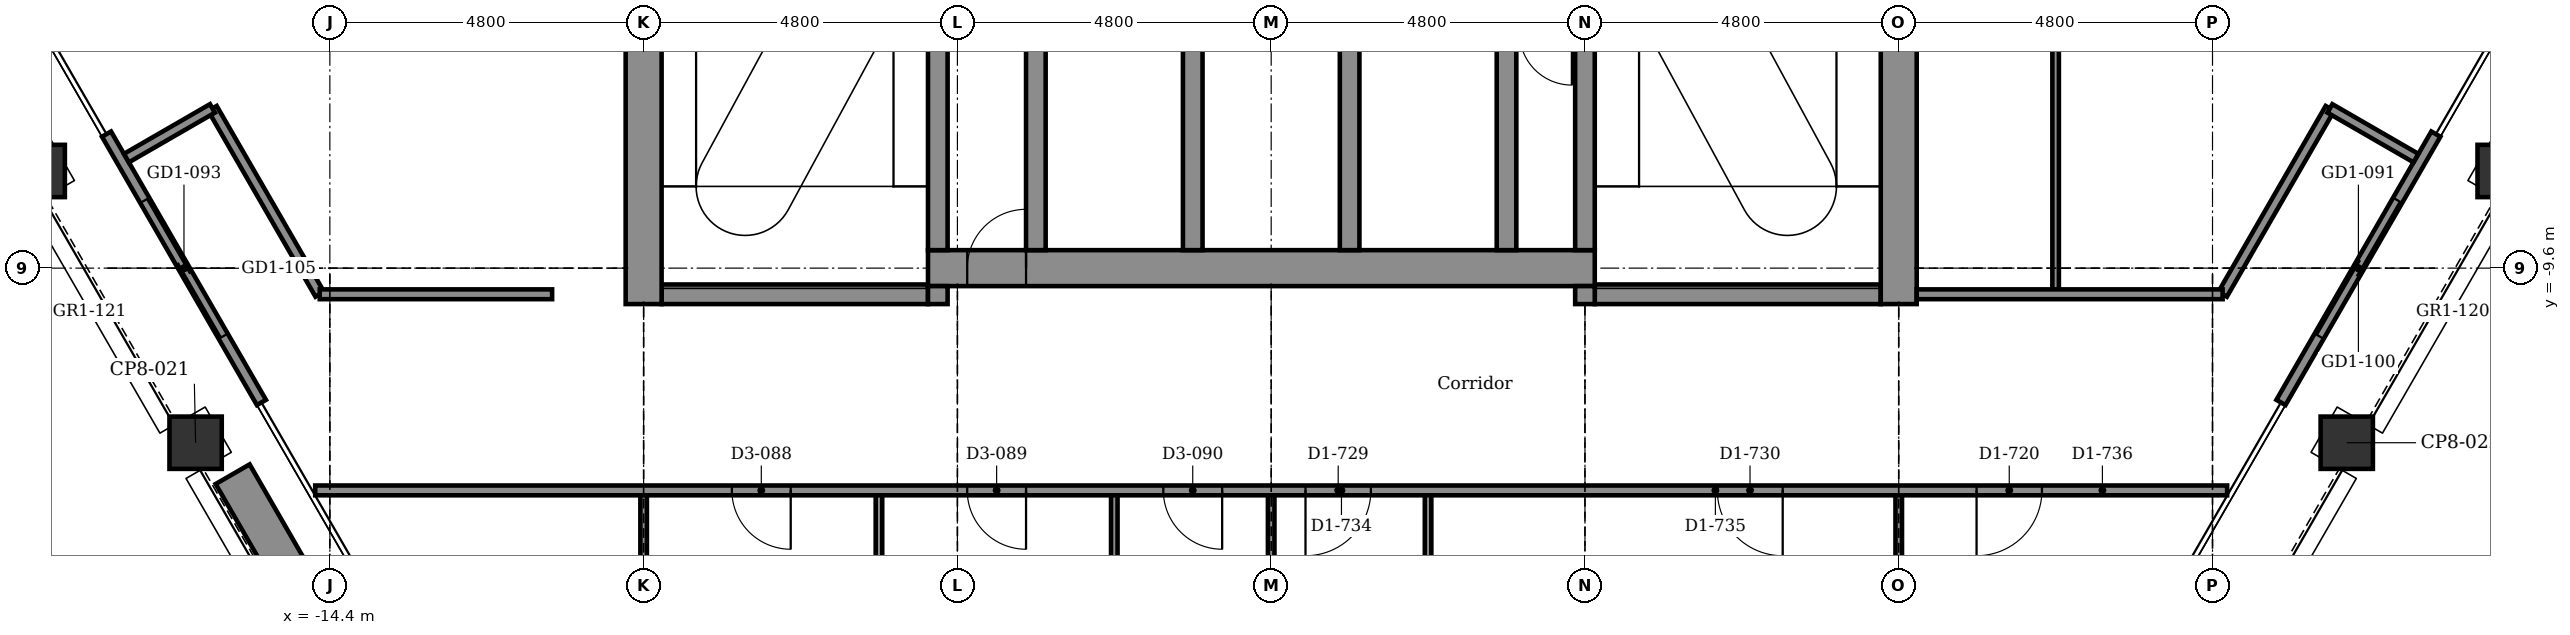
"""IFC4 building model, lengths in metres.
Left out: names, types, materials, properties, quantities, classifications, styles, units other than length and angle.
Written with IfcOpenShell. Run it as: python <this file> out.ifc"""

import sys

from ifc_helpers import new_model, si_unit, direction, frame, frame_2d, origin, origin_2d, place, context, subcontext, project, spatial, rectangle, extrude, element, fill, save


model = new_model("IFC4")
c1 = context("Model", 3, precision=1e-05, world=origin(), true_north=direction((0.0, 1.0)))
c2 = subcontext(c1, "Body", "Model", "MODEL_VIEW")
j1 = project(units=[si_unit("LENGTHUNIT", "METRE"), si_unit("PLANEANGLEUNIT", "RADIAN")], contexts=[c1])
p1 = place(None, origin())
s1 = spatial("IfcSite", under=j1, at=p1, CompositionType="ELEMENT")
p2 = place(p1, origin())
s2 = spatial("IfcBuilding", under=s1, at=p2, CompositionType="ELEMENT")
p3 = place(p2, frame((0.0, 0.0, 273.5)))
s3 = spatial("IfcBuildingStorey", under=s2, at=p3, CompositionType="ELEMENT", Elevation=273.5)
for number, where, z_axis, x_axis in (
    (1, (18.854, -8.114, -0.15), (0.0, 0.0, 1.0), (0.5, 0.866, 0.0)),
    (2, (16.454, -12.271, -0.15), (0.0, 0.0, 1.0), (0.5, 0.866, 0.0)),
    (3, (-16.454, -12.271, -0.15), (0.0, 0.0, 1.0), (0.866, 0.5, 0.0)),
    (4, (-18.854, -8.114, -0.15), (0.0, 0.0, 1.0), (0.866, 0.5, 0.0)),
):
    element("IfcColumn", number, at=place(p3, frame(where, z_axis=z_axis, x_axis=x_axis)), inside=s3, PredefinedType="COLUMN", context=c2, shape_type="SweptSolid", body=[
        extrude(rectangle(XDim=0.8, YDim=0.8, at=origin_2d()), origin(), (0.0, 0.0, 1.0), 3.9),
    ])
p4 = place(p3, frame((-9.325, -10.0, -0.15), z_axis=(0.0, 0.0, 1.0), x_axis=(1.0, 0.0, 0.0)))
e5 = element("IfcWall", 5, at=p4, inside=s3, PredefinedType="STANDARD", context=c2, shape_type="SweptSolid", body=[
    extrude(rectangle(XDim=4.075, YDim=0.3, at=frame_2d((2.038, 0.0))), origin(), (0.0, 0.0, 1.0), 3.9),
])
p5 = place(p3, frame((4.95, -10.0, -0.15), z_axis=(0.0, 0.0, 1.0), x_axis=(1.0, 0.0, 0.0)))
e6 = element("IfcWall", 6, at=p5, inside=s3, PredefinedType="STANDARD", context=c2, shape_type="SweptSolid", body=[
    extrude(rectangle(XDim=4.375, YDim=0.3, at=frame_2d((2.188, 0.0))), origin(), (0.0, 0.0, 1.0), 3.9),
])
p6 = place(p3, frame((-5.25, -9.6, -0.15), z_axis=(0.0, 0.0, 1.0), x_axis=(1.0, 0.0, 0.0)))
e7 = element("IfcWall", 7, at=p6, inside=s3, PredefinedType="SHEAR", context=c2, shape_type="SweptSolid", body=[
    extrude(rectangle(XDim=10.2, YDim=0.55, at=frame_2d((5.1, 0.0))), origin(), (0.0, 0.0, 1.0), 3.9),
])
p7 = place(p6, frame((0.6, 0.0, 0.15)))
e8 = element("IfcOpeningElement", 8, at=p7, cuts=e7, PredefinedType="OPENING", context=c2, shape_type="SweptSolid", body=[
    extrude(rectangle(XDim=0.9, YDim=2.1, at=frame_2d((0.45, 1.05))), frame((0.0, 0.285, 0.0), z_axis=(0.0, -1.0, 0.0), x_axis=(1.0, 0.0, 0.0)), (0.0, 0.0, 1.0), 0.57),
])
p8 = place(p3, frame((-9.6, -10.15, -0.15), z_axis=(0.0, 0.0, 1.0), x_axis=(0.0, 1.0, 0.0)))
e9 = element("IfcWall", 9, at=p8, inside=s3, PredefinedType="SHEAR", context=c2, shape_type="SweptSolid", body=[
    extrude(rectangle(XDim=7.6, YDim=0.55, at=frame_2d((3.8, 0.0))), origin(), (0.0, 0.0, 1.0), 3.9),
])
p9 = place(p3, frame((-5.1, -10.15, -0.15), z_axis=(0.0, 0.0, 1.0), x_axis=(0.0, 1.0, 0.0)))
e10 = element("IfcWall", 10, at=p9, inside=s3, PredefinedType="STANDARD", context=c2, shape_type="SweptSolid", body=[
    extrude(rectangle(XDim=0.275, YDim=0.3, at=frame_2d((0.137, 0.0))), origin(), (0.0, 0.0, 1.0), 3.9),
])
p10 = place(p3, frame((-5.1, -9.325, -0.15), z_axis=(0.0, 0.0, 1.0), x_axis=(0.0, 1.0, 0.0)))
e11 = element("IfcWall", 11, at=p10, inside=s3, PredefinedType="STANDARD", context=c2, shape_type="SweptSolid", body=[
    extrude(rectangle(XDim=7.075, YDim=0.3, at=frame_2d((3.538, 0.0))), origin(), (0.0, 0.0, 1.0), 3.9),
])
p11 = place(p10, frame((3.875, 0.0, 0.15)))
e12 = element("IfcOpeningElement", 12, at=p11, cuts=e11, PredefinedType="OPENING", context=c2, shape_type="SweptSolid", body=[
    extrude(rectangle(XDim=1.2, YDim=2.1, at=frame_2d((0.6, 1.05))), frame((0.0, 0.16, 0.0), z_axis=(0.0, -1.0, 0.0), x_axis=(1.0, 0.0, 0.0)), (0.0, 0.0, 1.0), 0.32),
])
for number, where, z_axis, x_axis in (
    (13, (-3.6, -9.325, -0.15), (0.0, 0.0, 1.0), (0.0, 1.0, 0.0)),
    (14, (-1.2, -9.325, -0.15), (0.0, 0.0, 1.0), (0.0, 1.0, 0.0)),
    (15, (1.2, -9.325, -0.15), (0.0, 0.0, 1.0), (0.0, 1.0, 0.0)),
    (16, (3.6, -9.325, -0.15), (0.0, 0.0, 1.0), (0.0, 1.0, 0.0)),
):
    element("IfcWall", number, at=place(p3, frame(where, z_axis=z_axis, x_axis=x_axis)), inside=s3, PredefinedType="STANDARD", context=c2, shape_type="SweptSolid", body=[
        extrude(rectangle(XDim=3.475, YDim=0.3, at=frame_2d((1.737, 0.0))), origin(), (0.0, 0.0, 1.0), 3.9),
    ])
p12 = place(p3, frame((4.8, -10.15, -0.15), z_axis=(0.0, 0.0, 1.0), x_axis=(0.0, 1.0, 0.0)))
e17 = element("IfcWall", 17, at=p12, inside=s3, PredefinedType="STANDARD", context=c2, shape_type="SweptSolid", body=[
    extrude(rectangle(XDim=0.275, YDim=0.3, at=frame_2d((0.137, 0.0))), origin(), (0.0, 0.0, 1.0), 3.9),
])
p13 = place(p3, frame((4.8, -9.325, -0.15), z_axis=(0.0, 0.0, 1.0), x_axis=(0.0, 1.0, 0.0)))
e18 = element("IfcWall", 18, at=p13, inside=s3, PredefinedType="STANDARD", context=c2, shape_type="SweptSolid", body=[
    extrude(rectangle(XDim=7.075, YDim=0.3, at=frame_2d((3.538, 0.0))), origin(), (0.0, 0.0, 1.0), 3.9),
])
p14 = place(p13, frame((3.875, 0.0, 0.15)))
e19 = element("IfcOpeningElement", 19, at=p14, cuts=e18, PredefinedType="OPENING", context=c2, shape_type="SweptSolid", body=[
    extrude(rectangle(XDim=1.2, YDim=2.1, at=frame_2d((0.6, 1.05))), frame((0.0, 0.16, 0.0), z_axis=(0.0, -1.0, 0.0), x_axis=(1.0, 0.0, 0.0)), (0.0, 0.0, 1.0), 0.32),
])
p15 = place(p3, frame((9.6, -10.15, -0.15), z_axis=(0.0, 0.0, 1.0), x_axis=(0.0, 1.0, 0.0)))
e20 = element("IfcWall", 20, at=p15, inside=s3, PredefinedType="SHEAR", context=c2, shape_type="SweptSolid", body=[
    extrude(rectangle(XDim=20.075, YDim=0.55, at=frame_2d((10.038, 0.0))), origin(), (0.0, 0.0, 1.0), 3.9),
])
p16 = place(p3, frame((17.817, -7.55, 0.0), z_axis=(0.0, 0.0, 1.0), x_axis=(-0.499978080042, -0.866038058908, 0.0)))
e21 = element("IfcWall", 21, at=p16, inside=s3, PredefinedType="PARTITIONING", context=c2, shape_type="SweptSolid", body=[
    extrude(rectangle(XDim=4.74, YDim=0.16, at=frame_2d((2.37, 0.0))), origin(), (0.0, 0.0, 1.0), 3.75),
])
p17 = place(p16, frame((1.17, 0.0, 0.0)))
e22 = element("IfcOpeningElement", 22, at=p17, cuts=e21, PredefinedType="OPENING", context=c2, shape_type="SweptSolid", body=[
    extrude(rectangle(XDim=2.4, YDim=2.4, at=frame_2d((1.2, 1.2))), frame((0.0, 0.09, 0.0), z_axis=(0.0, -1.0, 0.0), x_axis=(1.0, 0.0, 0.0)), (0.0, 0.0, 1.0), 0.18),
])
p18 = place(p3, frame((-15.447, -11.655, 0.0), z_axis=(0.0, 0.0, 1.0), x_axis=(-0.499978080042, 0.866038058908, 0.0)))
e23 = element("IfcWall", 23, at=p18, inside=s3, PredefinedType="PARTITIONING", context=c2, shape_type="SweptSolid", body=[
    extrude(rectangle(XDim=4.74, YDim=0.16, at=frame_2d((2.37, 0.0))), origin(), (0.0, 0.0, 1.0), 3.75),
])
p19 = place(p18, frame((1.17, 0.0, 0.0)))
e24 = element("IfcOpeningElement", 24, at=p19, cuts=e23, PredefinedType="OPENING", context=c2, shape_type="SweptSolid", body=[
    extrude(rectangle(XDim=2.4, YDim=2.4, at=frame_2d((1.2, 1.2))), frame((0.0, 0.09, 0.0), z_axis=(0.0, -1.0, 0.0), x_axis=(1.0, 0.0, 0.0)), (0.0, 0.0, 1.0), 0.18),
])
p20 = place(p3, frame((-14.187, -15.697, 0.0), z_axis=(0.0, 0.0, 1.0), x_axis=(-0.499977295307, 0.866038511948, 0.0)))
e25 = element("IfcWall", 25, at=p20, inside=s3, PredefinedType="USERDEFINED", context=c2, shape_type="SweptSolid", body=[
    extrude(rectangle(XDim=3.4, YDim=0.6, at=frame_2d((1.7, 0.0))), origin(), (0.0, 0.0, 1.0), 0.7),
])
p21 = place(p3, frame((12.0, -10.0, 0.0), z_axis=(0.0, 0.0, 1.0), x_axis=(0.0, 1.0, 0.0)))
e26 = element("IfcWall", 26, at=p21, inside=s3, PredefinedType="PARTITIONING", context=c2, shape_type="SweptSolid", body=[
    extrude(rectangle(XDim=20.0, YDim=0.1, at=frame_2d((10.0, 0.0))), origin(), (0.0, 0.0, 1.0), 3.75),
])
p22 = place(p3, frame((9.6, -19.115, 0.0), z_axis=(0.0, 0.0, 1.0), x_axis=(0.0, 1.0, 0.0)))
e27 = element("IfcWall", 27, at=p22, inside=s3, PredefinedType="PARTITIONING", context=c2, shape_type="SweptSolid", body=[
    extrude(rectangle(XDim=6.115, YDim=0.1, at=frame_2d((3.057, 0.0))), origin(), (0.0, 0.0, 1.0), 3.293),
])
p23 = place(p3, frame((2.4, -19.125, 0.0), z_axis=(0.0, 0.0, 1.0), x_axis=(0.0, 1.0, 0.0)))
e28 = element("IfcWall", 28, at=p23, inside=s3, PredefinedType="PARTITIONING", context=c2, shape_type="SweptSolid", body=[
    extrude(rectangle(XDim=6.125, YDim=0.1, at=frame_2d((3.062, 0.0))), origin(), (0.0, 0.0, 1.0), 3.75),
])
p24 = place(p3, frame((0.0, -17.8, 0.0), z_axis=(0.0, 0.0, 1.0), x_axis=(0.0, 1.0, 0.0)))
e29 = element("IfcWall", 29, at=p24, inside=s3, PredefinedType="PARTITIONING", context=c2, shape_type="SweptSolid", body=[
    extrude(rectangle(XDim=4.8, YDim=0.1, at=frame_2d((2.4, 0.0))), origin(), (0.0, 0.0, 1.0), 3.217),
])
for number, where, z_axis, x_axis in (
    (30, (-2.4, -17.8, 0.0), (0.0, 0.0, 1.0), (0.0, 1.0, 0.0)),
    (31, (-6.0, -17.8, 0.0), (0.0, 0.0, 1.0), (0.0, 1.0, 0.0)),
):
    element("IfcWall", number, at=place(p3, frame(where, z_axis=z_axis, x_axis=x_axis)), inside=s3, PredefinedType="PARTITIONING", context=c2, shape_type="SweptSolid", body=[
        extrude(rectangle(XDim=4.8, YDim=0.1, at=frame_2d((2.4, 0.0))), origin(), (0.0, 0.0, 1.0), 3.75),
    ])
p25 = place(p3, frame((-9.6, -17.8, 0.0), z_axis=(0.0, 0.0, 1.0), x_axis=(0.0, 1.0, 0.0)))
e32 = element("IfcWall", 32, at=p25, inside=s3, PredefinedType="PARTITIONING", context=c2, shape_type="SweptSolid", body=[
    extrude(rectangle(XDim=4.8, YDim=0.1, at=frame_2d((2.4, 0.0))), origin(), (0.0, 0.0, 1.0), 3.293),
])
for number, where, z_axis, x_axis in (
    (33, (-16.196, -7.157, 0.0), (0.0, 0.0, 1.0), (0.5, -0.866, 0.0)),
    (34, (14.555, -10.0, 0.0), (0.0, 0.0, 1.0), (0.5, 0.866, 0.0)),
):
    element("IfcWall", number, at=place(p3, frame(where, z_axis=z_axis, x_axis=x_axis)), inside=s3, PredefinedType="PARTITIONING", context=c2, shape_type="SweptSolid", body=[
        extrude(rectangle(XDim=3.283, YDim=0.15, at=frame_2d((1.642, 0.0))), origin(), (0.0, 0.0, 1.0), 3.75),
    ])
for number, where, z_axis, x_axis in (
    (35, (16.196, -7.157, 0.0), (0.0, 0.0, 1.0), (0.866, -0.5, 0.0)),
    (36, (-17.512, -7.917, 0.0), (0.0, 0.0, 1.0), (0.866, 0.5, 0.0)),
):
    element("IfcWall", number, at=place(p3, frame(where, z_axis=z_axis, x_axis=x_axis)), inside=s3, PredefinedType="PARTITIONING", context=c2, shape_type="SweptSolid", body=[
        extrude(rectangle(XDim=1.52, YDim=0.15, at=frame_2d((0.76, 0.0))), origin(), (0.0, 0.0, 1.0), 3.75),
    ])
p26 = place(p3, frame((-14.624, -13.0, 0.0), z_axis=(0.0, 0.0, 1.0), x_axis=(1.0, 0.0, 0.0)))
e37 = element("IfcWall", 37, at=p26, inside=s3, PredefinedType="PARTITIONING", context=c2, shape_type="SweptSolid", body=[
    extrude(rectangle(XDim=29.248, YDim=0.15, at=frame_2d((14.624, 0.0))), origin(), (0.0, 0.0, 1.0), 3.75),
])
p27 = place(p26, frame((6.374, 0.0, 0.0)))
e38 = element("IfcOpeningElement", 38, at=p27, cuts=e37, PredefinedType="OPENING", context=c2, shape_type="SweptSolid", body=[
    extrude(rectangle(XDim=0.9, YDim=2.1, at=frame_2d((0.45, 1.05))), frame((0.0, 0.085, 0.0), z_axis=(0.0, -1.0, 0.0), x_axis=(1.0, 0.0, 0.0)), (0.0, 0.0, 1.0), 0.17),
])
p28 = place(p26, frame((9.974, 0.0, 0.0)))
e39 = element("IfcOpeningElement", 39, at=p28, cuts=e37, PredefinedType="OPENING", context=c2, shape_type="SweptSolid", body=[
    extrude(rectangle(XDim=0.9, YDim=2.1, at=frame_2d((0.45, 1.05))), frame((0.0, 0.085, 0.0), z_axis=(0.0, -1.0, 0.0), x_axis=(1.0, 0.0, 0.0)), (0.0, 0.0, 1.0), 0.17),
])
p29 = place(p26, frame((12.974, 0.0, 0.0)))
e40 = element("IfcOpeningElement", 40, at=p29, cuts=e37, PredefinedType="OPENING", context=c2, shape_type="SweptSolid", body=[
    extrude(rectangle(XDim=0.9, YDim=2.1, at=frame_2d((0.45, 1.05))), frame((0.0, 0.085, 0.0), z_axis=(0.0, -1.0, 0.0), x_axis=(1.0, 0.0, 0.0)), (0.0, 0.0, 1.0), 0.17),
])
p30 = place(p26, frame((15.149, 0.0, 0.0)))
e41 = element("IfcOpeningElement", 41, at=p30, cuts=e37, PredefinedType="OPENING", context=c2, shape_type="SweptSolid", body=[
    extrude(rectangle(XDim=1.0, YDim=2.1, at=frame_2d((0.5, 1.05))), frame((0.0, 0.085, 0.0), z_axis=(0.0, -1.0, 0.0), x_axis=(1.0, 0.0, 0.0)), (0.0, 0.0, 1.0), 0.17),
])
p31 = place(p26, frame((21.449, 0.0, 0.0)))
e42 = element("IfcOpeningElement", 42, at=p31, cuts=e37, PredefinedType="OPENING", context=c2, shape_type="SweptSolid", body=[
    extrude(rectangle(XDim=1.0, YDim=2.1, at=frame_2d((0.5, 1.05))), frame((0.0, 0.085, 0.0), z_axis=(0.0, -1.0, 0.0), x_axis=(1.0, 0.0, 0.0)), (0.0, 0.0, 1.0), 0.17),
])
p32 = place(p26, frame((25.414, 0.0, 0.0)))
e43 = element("IfcOpeningElement", 43, at=p32, cuts=e37, PredefinedType="OPENING", context=c2, shape_type="SweptSolid", body=[
    extrude(rectangle(XDim=1.0, YDim=2.1, at=frame_2d((0.5, 1.05))), frame((0.0, 0.085, 0.0), z_axis=(0.0, -1.0, 0.0), x_axis=(1.0, 0.0, 0.0)), (0.0, 0.0, 1.0), 0.17),
])
p33 = place(p3, frame((-14.555, -10.0, 0.0), z_axis=(0.0, 0.0, 1.0), x_axis=(1.0, 0.0, 0.0)))
e44 = element("IfcWall", 44, at=p33, inside=s3, PredefinedType="PARTITIONING", context=c2, shape_type="SweptSolid", body=[
    extrude(rectangle(XDim=3.555, YDim=0.15, at=frame_2d((1.777, 0.0))), origin(), (0.0, 0.0, 1.0), 3.75),
])
p34 = place(p3, frame((9.875, -10.0, 0.0), z_axis=(0.0, 0.0, 1.0), x_axis=(1.0, 0.0, 0.0)))
e45 = element("IfcWall", 45, at=p34, inside=s3, PredefinedType="PARTITIONING", context=c2, shape_type="SweptSolid", body=[
    extrude(rectangle(XDim=4.68, YDim=0.15, at=frame_2d((2.34, 0.0))), origin(), (0.0, 0.0, 1.0), 3.75),
])
p35 = place(p17, origin())
e46 = element("IfcDoor", 46, at=p35, inside=s3, OperationType="DOUBLE_DOOR_SLIDING", PredefinedType="DOOR", context=c2, shape_type="SweptSolid", body=[
    extrude(rectangle(XDim=2.4, YDim=2.4, at=frame_2d((1.2, 1.2))), frame((0.0, 0.025, 0.0), z_axis=(0.0, -1.0, 0.0), x_axis=(1.0, 0.0, 0.0)), (0.0, 0.0, 1.0), 0.05),
])
fill(e22, e46)
p36 = place(p19, origin())
e47 = element("IfcDoor", 47, at=p36, inside=s3, OperationType="DOUBLE_DOOR_SLIDING", PredefinedType="DOOR", context=c2, shape_type="SweptSolid", body=[
    extrude(rectangle(XDim=2.4, YDim=2.4, at=frame_2d((1.2, 1.2))), frame((0.0, 0.025, 0.0), z_axis=(0.0, -1.0, 0.0), x_axis=(1.0, 0.0, 0.0)), (0.0, 0.0, 1.0), 0.05),
])
fill(e24, e47)
p37 = place(p27, frame((0.9, 0.0, 0.0), z_axis=(0.0, 0.0, 1.0), x_axis=(-1.0, 0.0, 0.0)))
e48 = element("IfcDoor", 48, at=p37, inside=s3, OperationType="SINGLE_SWING_RIGHT", PredefinedType="DOOR", context=c2, shape_type="SweptSolid", body=[
    extrude(rectangle(XDim=0.9, YDim=2.1, at=frame_2d((0.45, 1.05))), frame((0.0, 0.025, 0.0), z_axis=(0.0, -1.0, 0.0), x_axis=(1.0, 0.0, 0.0)), (0.0, 0.0, 1.0), 0.05),
])
fill(e38, e48)
p38 = place(p28, frame((0.9, 0.0, 0.0), z_axis=(0.0, 0.0, 1.0), x_axis=(-1.0, 0.0, 0.0)))
e49 = element("IfcDoor", 49, at=p38, inside=s3, OperationType="SINGLE_SWING_RIGHT", PredefinedType="DOOR", context=c2, shape_type="SweptSolid", body=[
    extrude(rectangle(XDim=0.9, YDim=2.1, at=frame_2d((0.45, 1.05))), frame((0.0, 0.025, 0.0), z_axis=(0.0, -1.0, 0.0), x_axis=(1.0, 0.0, 0.0)), (0.0, 0.0, 1.0), 0.05),
])
fill(e39, e49)
p39 = place(p29, frame((0.9, 0.0, 0.0), z_axis=(0.0, 0.0, 1.0), x_axis=(-1.0, 0.0, 0.0)))
e50 = element("IfcDoor", 50, at=p39, inside=s3, OperationType="SINGLE_SWING_RIGHT", PredefinedType="DOOR", context=c2, shape_type="SweptSolid", body=[
    extrude(rectangle(XDim=0.9, YDim=2.1, at=frame_2d((0.45, 1.05))), frame((0.0, 0.025, 0.0), z_axis=(0.0, -1.0, 0.0), x_axis=(1.0, 0.0, 0.0)), (0.0, 0.0, 1.0), 0.05),
])
fill(e40, e50)
p40 = place(p30, frame((1.0, 0.0, 0.0), z_axis=(0.0, 0.0, 1.0), x_axis=(-1.0, 0.0, 0.0)))
e51 = element("IfcDoor", 51, at=p40, inside=s3, OperationType="SINGLE_SWING_LEFT", PredefinedType="DOOR", context=c2, shape_type="SweptSolid", body=[
    extrude(rectangle(XDim=1.0, YDim=2.1, at=frame_2d((0.5, 1.05))), frame((0.0, 0.025, 0.0), z_axis=(0.0, -1.0, 0.0), x_axis=(1.0, 0.0, 0.0)), (0.0, 0.0, 1.0), 0.05),
])
fill(e41, e51)
p41 = place(p31, frame((1.0, 0.0, 0.0), z_axis=(0.0, 0.0, 1.0), x_axis=(-1.0, 0.0, 0.0)))
e52 = element("IfcDoor", 52, at=p41, inside=s3, OperationType="SINGLE_SWING_RIGHT", PredefinedType="DOOR", context=c2, shape_type="SweptSolid", body=[
    extrude(rectangle(XDim=1.0, YDim=2.1, at=frame_2d((0.5, 1.05))), frame((0.0, 0.025, 0.0), z_axis=(0.0, -1.0, 0.0), x_axis=(1.0, 0.0, 0.0)), (0.0, 0.0, 1.0), 0.05),
])
fill(e42, e52)
p42 = place(p32, frame((1.0, 0.0, 0.0), z_axis=(0.0, 0.0, 1.0), x_axis=(-1.0, 0.0, 0.0)))
e53 = element("IfcDoor", 53, at=p42, inside=s3, OperationType="SINGLE_SWING_LEFT", PredefinedType="DOOR", context=c2, shape_type="SweptSolid", body=[
    extrude(rectangle(XDim=1.0, YDim=2.1, at=frame_2d((0.5, 1.05))), frame((0.0, 0.025, 0.0), z_axis=(0.0, -1.0, 0.0), x_axis=(1.0, 0.0, 0.0)), (0.0, 0.0, 1.0), 0.05),
])
fill(e43, e53)
p43 = place(p7, origin())
e54 = element("IfcDoor", 54, at=p43, inside=s3, OperationType="SINGLE_SWING_RIGHT", PredefinedType="DOOR", context=c2, shape_type="SweptSolid", body=[
    extrude(rectangle(XDim=0.9, YDim=2.1, at=frame_2d((0.45, 1.05))), frame((0.0, 0.025, 0.0), z_axis=(0.0, -1.0, 0.0), x_axis=(1.0, 0.0, 0.0)), (0.0, 0.0, 1.0), 0.05),
])
fill(e8, e54)
save(model, sys.argv[1])
